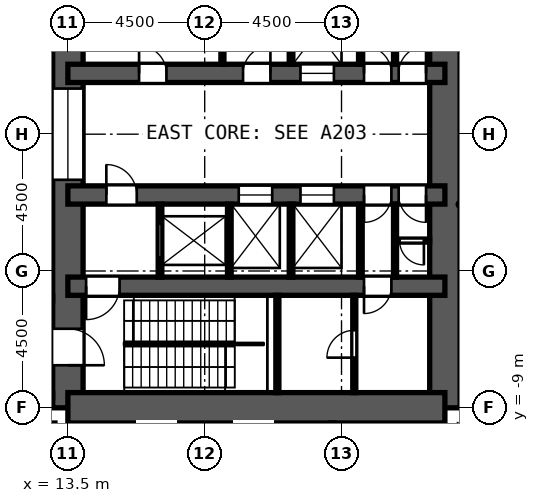
"""IFC4 building model, lengths in metres.
Left out: names, types, materials, properties, quantities, classifications, styles, units other than length and angle.
Written with IfcOpenShell. Run it as: python <this file> out.ifc"""

import sys

from ifc_helpers import new_model, si_unit, direction, frame, frame_2d, origin, place, context, subcontext, project, spatial, rectangle, extrude, element, fill, save


model = new_model("IFC4")
c1 = context("Model", 3, precision=1e-05, world=origin(), true_north=direction((0.0, 1.0)))
c2 = subcontext(c1, "Body", "Model", "MODEL_VIEW")
j1 = project(units=[si_unit("LENGTHUNIT", "METRE"), si_unit("PLANEANGLEUNIT", "RADIAN")], contexts=[c1])
p1 = place(None, origin())
s1 = spatial("IfcSite", under=j1, at=p1, CompositionType="ELEMENT")
p2 = place(p1, origin())
s2 = spatial("IfcBuilding", under=s1, at=p2, CompositionType="ELEMENT")
p3 = place(p2, origin())
s3 = spatial("IfcBuildingStorey", under=s2, at=p3, CompositionType="ELEMENT", Elevation=0.0)
p4 = place(p3, frame((13.5, -9.0, 0.0), z_axis=(0.0, 0.0, 1.0), x_axis=(0.0, 1.0, 0.0)))
e1 = element("IfcWall", 1, at=p4, inside=s3, PredefinedType="SHEAR", context=c2, shape_type="SweptSolid", body=[
    extrude(rectangle(XDim=18.0, YDim=1.0, at=frame_2d((9.0, 0.0))), origin(), (0.0, 0.0, 1.0), 5.0),
])
p5 = place(p4, frame((15.4, 0.0, 0.0)))
e2 = element("IfcOpeningElement", 2, at=p5, cuts=e1, PredefinedType="OPENING", context=c2, shape_type="SweptSolid", body=[
    extrude(rectangle(XDim=1.2, YDim=2.1, at=frame_2d((0.6, 1.05))), frame((0.0, 0.512, 0.0), z_axis=(0.0, -1.0, 0.0), x_axis=(1.0, 0.0, 0.0)), (0.0, 0.0, 1.0), 1.024),
])
p6 = place(p4, frame((1.4, 0.0, 0.0)))
e3 = element("IfcOpeningElement", 3, at=p6, cuts=e1, PredefinedType="OPENING", context=c2, shape_type="SweptSolid", body=[
    extrude(rectangle(XDim=1.2, YDim=2.1, at=frame_2d((0.6, 1.05))), frame((0.0, 0.512, 0.0), z_axis=(0.0, -1.0, 0.0), x_axis=(1.0, 0.0, 0.0)), (0.0, 0.0, 1.0), 1.024),
])
p7 = place(p4, frame((7.5, 0.0, 0.0)))
e4 = element("IfcOpeningElement", 4, at=p7, cuts=e1, PredefinedType="OPENING", context=c2, shape_type="SweptSolid", body=[
    extrude(rectangle(XDim=3.0, YDim=2.4, at=frame_2d((1.5, 1.2))), frame((0.0, 0.512, 0.0), z_axis=(0.0, -1.0, 0.0), x_axis=(1.0, 0.0, 0.0)), (0.0, 0.0, 1.0), 1.024),
])
p8 = place(p3, frame((25.9, -9.0, 0.0), z_axis=(0.0, 0.0, 1.0), x_axis=(0.0, 1.0, 0.0)))
e5 = element("IfcWall", 5, at=p8, inside=s3, PredefinedType="SHEAR", context=c2, shape_type="SweptSolid", body=[
    extrude(rectangle(XDim=18.0, YDim=1.0, at=frame_2d((9.0, 0.0))), origin(), (0.0, 0.0, 1.0), 5.0),
])
p9 = place(p3, frame((13.5, -9.0, 0.0), z_axis=(0.0, 0.0, 1.0), x_axis=(1.0, 0.0, 0.0)))
e6 = element("IfcWall", 6, at=p9, inside=s3, PredefinedType="SHEAR", context=c2, shape_type="SweptSolid", body=[
    extrude(rectangle(XDim=12.4, YDim=1.0, at=frame_2d((6.2, 0.0))), origin(), (0.0, 0.0, 1.0), 5.0),
])
p10 = place(p3, frame((13.5, -5.0, 0.0), z_axis=(0.0, 0.0, 1.0), x_axis=(1.0, 0.0, 0.0)))
e7 = element("IfcWall", 7, at=p10, inside=s3, PredefinedType="SHEAR", context=c2, shape_type="SweptSolid", body=[
    extrude(rectangle(XDim=12.4, YDim=0.6, at=frame_2d((6.2, 0.0))), origin(), (0.0, 0.0, 1.0), 5.0),
])
p11 = place(p10, frame((9.74, 0.0, 0.0)))
e8 = element("IfcOpeningElement", 8, at=p11, cuts=e7, PredefinedType="OPENING", context=c2, shape_type="SweptSolid", body=[
    extrude(rectangle(XDim=0.9, YDim=2.1, at=frame_2d((0.45, 1.05))), frame((0.0, 0.312, 0.0), z_axis=(0.0, -1.0, 0.0), x_axis=(1.0, 0.0, 0.0)), (0.0, 0.0, 1.0), 0.624),
])
p12 = place(p10, frame((0.6, 0.0, 0.0)))
e9 = element("IfcOpeningElement", 9, at=p12, cuts=e7, PredefinedType="OPENING", context=c2, shape_type="SweptSolid", body=[
    extrude(rectangle(XDim=1.1, YDim=2.1, at=frame_2d((0.55, 1.05))), frame((0.0, 0.312, 0.0), z_axis=(0.0, -1.0, 0.0), x_axis=(1.0, 0.0, 0.0)), (0.0, 0.0, 1.0), 0.624),
])
p13 = place(p3, frame((13.5, 2.0, 0.0), z_axis=(0.0, 0.0, 1.0), x_axis=(1.0, 0.0, 0.0)))
e10 = element("IfcWall", 10, at=p13, inside=s3, PredefinedType="SHEAR", context=c2, shape_type="SweptSolid", body=[
    extrude(rectangle(XDim=12.4, YDim=0.6, at=frame_2d((6.2, 0.0))), origin(), (0.0, 0.0, 1.0), 5.0),
])
p14 = place(p13, frame((7.65, 0.0, 0.0)))
e11 = element("IfcOpeningElement", 11, at=p14, cuts=e10, PredefinedType="OPENING", context=c2, shape_type="SweptSolid", body=[
    extrude(rectangle(XDim=1.1, YDim=2.1, at=frame_2d((0.55, 1.05))), frame((0.0, 0.312, 0.0), z_axis=(0.0, -1.0, 0.0), x_axis=(1.0, 0.0, 0.0)), (0.0, 0.0, 1.0), 0.624),
])
p15 = place(p13, frame((2.341, 0.0, 0.0)))
e12 = element("IfcOpeningElement", 12, at=p15, cuts=e10, PredefinedType="OPENING", context=c2, shape_type="SweptSolid", body=[
    extrude(rectangle(XDim=0.9, YDim=2.1, at=frame_2d((0.45, 1.05))), frame((0.0, 0.312, 0.0), z_axis=(0.0, -1.0, 0.0), x_axis=(1.0, 0.0, 0.0)), (0.0, 0.0, 1.0), 0.624),
])
p16 = place(p13, frame((5.761, 0.0, 0.0)))
e13 = element("IfcOpeningElement", 13, at=p16, cuts=e10, PredefinedType="OPENING", context=c2, shape_type="SweptSolid", body=[
    extrude(rectangle(XDim=0.9, YDim=2.1, at=frame_2d((0.45, 1.05))), frame((0.0, 0.312, 0.0), z_axis=(0.0, -1.0, 0.0), x_axis=(1.0, 0.0, 0.0)), (0.0, 0.0, 1.0), 0.624),
])
p17 = place(p13, frame((9.74, 0.0, 0.0)))
e14 = element("IfcOpeningElement", 14, at=p17, cuts=e10, PredefinedType="OPENING", context=c2, shape_type="SweptSolid", body=[
    extrude(rectangle(XDim=0.9, YDim=2.1, at=frame_2d((0.45, 1.05))), frame((0.0, 0.312, 0.0), z_axis=(0.0, -1.0, 0.0), x_axis=(1.0, 0.0, 0.0)), (0.0, 0.0, 1.0), 0.624),
])
p18 = place(p13, frame((10.88, 0.0, 0.0)))
e15 = element("IfcOpeningElement", 15, at=p18, cuts=e10, PredefinedType="OPENING", context=c2, shape_type="SweptSolid", body=[
    extrude(rectangle(XDim=0.9, YDim=2.1, at=frame_2d((0.45, 1.05))), frame((0.0, 0.312, 0.0), z_axis=(0.0, -1.0, 0.0), x_axis=(1.0, 0.0, 0.0)), (0.0, 0.0, 1.0), 0.624),
])
p19 = place(p3, frame((13.5, -2.0, 0.0), z_axis=(0.0, 0.0, 1.0), x_axis=(1.0, 0.0, 0.0)))
e16 = element("IfcWall", 16, at=p19, inside=s3, PredefinedType="SHEAR", context=c2, shape_type="SweptSolid", body=[
    extrude(rectangle(XDim=12.4, YDim=0.6, at=frame_2d((6.2, 0.0))), origin(), (0.0, 0.0, 1.0), 5.0),
])
p20 = place(p19, frame((5.62, 0.0, 0.0)))
e17 = element("IfcOpeningElement", 17, at=p20, cuts=e16, PredefinedType="OPENING", context=c2, shape_type="SweptSolid", body=[
    extrude(rectangle(XDim=1.1, YDim=2.1, at=frame_2d((0.55, 1.05))), frame((0.0, 0.312, 0.0), z_axis=(0.0, -1.0, 0.0), x_axis=(1.0, 0.0, 0.0)), (0.0, 0.0, 1.0), 0.624),
])
p21 = place(p19, frame((7.65, 0.0, 0.0)))
e18 = element("IfcOpeningElement", 18, at=p21, cuts=e16, PredefinedType="OPENING", context=c2, shape_type="SweptSolid", body=[
    extrude(rectangle(XDim=1.1, YDim=2.1, at=frame_2d((0.55, 1.05))), frame((0.0, 0.312, 0.0), z_axis=(0.0, -1.0, 0.0), x_axis=(1.0, 0.0, 0.0)), (0.0, 0.0, 1.0), 0.624),
])
p22 = place(p19, frame((1.265, 0.0, 0.0)))
e19 = element("IfcOpeningElement", 19, at=p22, cuts=e16, PredefinedType="OPENING", context=c2, shape_type="SweptSolid", body=[
    extrude(rectangle(XDim=1.0, YDim=2.1, at=frame_2d((0.5, 1.05))), frame((0.0, 0.312, 0.0), z_axis=(0.0, -1.0, 0.0), x_axis=(1.0, 0.0, 0.0)), (0.0, 0.0, 1.0), 0.624),
])
p23 = place(p19, frame((9.74, 0.0, 0.0)))
e20 = element("IfcOpeningElement", 20, at=p23, cuts=e16, PredefinedType="OPENING", context=c2, shape_type="SweptSolid", body=[
    extrude(rectangle(XDim=0.9, YDim=2.1, at=frame_2d((0.45, 1.05))), frame((0.0, 0.312, 0.0), z_axis=(0.0, -1.0, 0.0), x_axis=(1.0, 0.0, 0.0)), (0.0, 0.0, 1.0), 0.624),
])
p24 = place(p19, frame((10.88, 0.0, 0.0)))
e21 = element("IfcOpeningElement", 21, at=p24, cuts=e16, PredefinedType="OPENING", context=c2, shape_type="SweptSolid", body=[
    extrude(rectangle(XDim=0.9, YDim=2.1, at=frame_2d((0.45, 1.05))), frame((0.0, 0.312, 0.0), z_axis=(0.0, -1.0, 0.0), x_axis=(1.0, 0.0, 0.0)), (0.0, 0.0, 1.0), 0.624),
])
p25 = place(p3, frame((26.328, -11.255, 0.0), z_axis=(0.0, 0.0, 1.0), x_axis=(0.342034744565, 0.939687306241, 0.0)))
e22 = element("IfcWall", 22, at=p25, inside=s3, PredefinedType="SOLIDWALL", context=c2, shape_type="SweptSolid", body=[
    extrude(rectangle(XDim=4.099, YDim=0.6, at=frame_2d((2.05, 0.0))), origin(), (0.0, 0.0, 1.0), 4.45),
])
p26 = place(p25, frame((0.372, 0.0, 0.3)))
e23 = element("IfcOpeningElement", 23, at=p26, cuts=e22, PredefinedType="OPENING", context=c2, shape_type="SweptSolid", body=[
    extrude(rectangle(XDim=2.4, YDim=2.1, at=frame_2d((1.2, 1.05))), frame((0.0, 0.312, 0.0), z_axis=(0.0, -1.0, 0.0), x_axis=(1.0, 0.0, 0.0)), (0.0, 0.0, 1.0), 0.624),
])
p27 = place(p3, frame((9.8, -8.6, 0.0), z_axis=(0.0, 0.0, 1.0), x_axis=(1.0, 0.0, 0.0)))
e24 = element("IfcWall", 24, at=p27, inside=s3, PredefinedType="PARTITIONING", context=c2, shape_type="SweptSolid", body=[
    extrude(rectangle(XDim=3.2, YDim=0.15, at=frame_2d((1.6, 0.0))), origin(), (0.0, 0.0, 1.0), 4.45),
])
p28 = place(p27, frame((1.0, 0.0, 0.0)))
e25 = element("IfcOpeningElement", 25, at=p28, cuts=e24, PredefinedType="OPENING", context=c2, shape_type="SweptSolid", body=[
    extrude(rectangle(XDim=1.2, YDim=2.1, at=frame_2d((0.6, 1.05))), frame((0.0, 0.087, 0.0), z_axis=(0.0, -1.0, 0.0), x_axis=(1.0, 0.0, 0.0)), (0.0, 0.0, 1.0), 0.174),
])
p29 = place(p3, frame((9.8, -5.4, 0.0), z_axis=(0.0, 0.0, 1.0), x_axis=(1.0, 0.0, 0.0)))
e26 = element("IfcWall", 26, at=p29, inside=s3, PredefinedType="PARTITIONING", context=c2, shape_type="SweptSolid", body=[
    extrude(rectangle(XDim=3.2, YDim=0.15, at=frame_2d((1.6, 0.0))), origin(), (0.0, 0.0, 1.0), 4.45),
])
p30 = place(p29, frame((1.0, 0.0, 0.0)))
e27 = element("IfcOpeningElement", 27, at=p30, cuts=e26, PredefinedType="OPENING", context=c2, shape_type="SweptSolid", body=[
    extrude(rectangle(XDim=1.2, YDim=2.1, at=frame_2d((0.6, 1.05))), frame((0.0, 0.087, 0.0), z_axis=(0.0, -1.0, 0.0), x_axis=(1.0, 0.0, 0.0)), (0.0, 0.0, 1.0), 0.174),
])
p31 = place(p3, frame((13.0, -15.325, 0.0), z_axis=(0.0, 0.0, 1.0), x_axis=(0.0, 1.0, 0.0)))
e28 = element("IfcWall", 28, at=p31, inside=s3, PredefinedType="PARTITIONING", context=c2, shape_type="SweptSolid", body=[
    extrude(rectangle(XDim=5.825, YDim=0.15, at=frame_2d((2.913, 0.0))), origin(), (0.0, 0.0, 1.0), 4.45),
])
p32 = place(p3, frame((18.583, 2.3, 0.0), z_axis=(0.0, 0.0, 1.0), x_axis=(0.0, 1.0, 0.0)))
e29 = element("IfcWall", 29, at=p32, inside=s3, PredefinedType="PARTITIONING", context=c2, shape_type="SweptSolid", body=[
    extrude(rectangle(XDim=2.4, YDim=0.1, at=frame_2d((1.2, 0.0))), origin(), (0.0, 0.0, 1.0), 4.45),
])
for number, where, z_axis, x_axis in (
    (30, (20.84, 2.3, 0.0), (0.0, 0.0, 1.0), (0.0, 1.0, 0.0)),
    (31, (23.12, 2.3, 0.0), (0.0, 0.0, 1.0), (0.0, 1.0, 0.0)),
):
    element("IfcWall", number, at=place(p3, frame(where, z_axis=z_axis, x_axis=x_axis)), inside=s3, PredefinedType="PARTITIONING", context=c2, shape_type="SweptSolid", body=[
        extrude(rectangle(XDim=2.4, YDim=0.12, at=frame_2d((1.2, 0.0))), origin(), (0.0, 0.0, 1.0), 4.45),
    ])
p33 = place(p3, frame((24.26, 2.3, 0.0), z_axis=(0.0, 0.0, 1.0), x_axis=(0.0, 1.0, 0.0)))
e32 = element("IfcWall", 32, at=p33, inside=s3, PredefinedType="PARTITIONING", context=c2, shape_type="SweptSolid", body=[
    extrude(rectangle(XDim=2.4, YDim=0.1, at=frame_2d((1.2, 0.0))), origin(), (0.0, 0.0, 1.0), 4.45),
])
p34 = place(p3, frame((16.53, -4.7, 0.0), z_axis=(0.0, 0.0, 1.0), x_axis=(0.0, 1.0, 0.0)))
e33 = element("IfcWall", 33, at=p34, inside=s3, PredefinedType="PARTITIONING", context=c2, shape_type="SweptSolid", body=[
    extrude(rectangle(XDim=2.4, YDim=0.12, at=frame_2d((1.2, 0.0))), origin(), (0.0, 0.0, 1.0), 4.45),
])
p35 = place(p34, frame((0.65, 0.0, 0.0)))
e34 = element("IfcOpeningElement", 34, at=p35, cuts=e33, PredefinedType="OPENING", context=c2, shape_type="SweptSolid", body=[
    extrude(rectangle(XDim=1.1, YDim=2.1, at=frame_2d((0.55, 1.05))), frame((0.0, 0.072, 0.0), z_axis=(0.0, -1.0, 0.0), x_axis=(1.0, 0.0, 0.0)), (0.0, 0.0, 1.0), 0.144),
])
for number, where, z_axis, x_axis in (
    (35, (18.81, -4.7, 0.0), (0.0, 0.0, 1.0), (0.0, 1.0, 0.0)),
    (36, (20.84, -4.7, 0.0), (0.0, 0.0, 1.0), (0.0, 1.0, 0.0)),
    (37, (23.12, -4.7, 0.0), (0.0, 0.0, 1.0), (0.0, 1.0, 0.0)),
):
    element("IfcWall", number, at=place(p3, frame(where, z_axis=z_axis, x_axis=x_axis)), inside=s3, PredefinedType="PARTITIONING", context=c2, shape_type="SweptSolid", body=[
        extrude(rectangle(XDim=2.4, YDim=0.12, at=frame_2d((1.2, 0.0))), origin(), (0.0, 0.0, 1.0), 4.45),
    ])
p36 = place(p3, frame((24.26, -4.7, 0.0), z_axis=(0.0, 0.0, 1.0), x_axis=(0.0, 1.0, 0.0)))
e38 = element("IfcWall", 38, at=p36, inside=s3, PredefinedType="PARTITIONING", context=c2, shape_type="SweptSolid", body=[
    extrude(rectangle(XDim=2.4, YDim=0.1, at=frame_2d((1.2, 0.0))), origin(), (0.0, 0.0, 1.0), 4.45),
])
p37 = place(p3, frame((24.26, -3.5, 0.0), z_axis=(0.0, 0.0, 1.0), x_axis=(1.0, 0.0, 0.0)))
e39 = element("IfcWall", 39, at=p37, inside=s3, PredefinedType="PARTITIONING", context=c2, shape_type="SweptSolid", body=[
    extrude(rectangle(XDim=1.14, YDim=0.1, at=frame_2d((0.57, 0.0))), origin(), (0.0, 0.0, 1.0), 4.45),
])
p38 = place(p37, frame((0.15, 0.0, 0.0)))
e40 = element("IfcOpeningElement", 40, at=p38, cuts=e39, PredefinedType="OPENING", context=c2, shape_type="SweptSolid", body=[
    extrude(rectangle(XDim=0.8, YDim=2.1, at=frame_2d((0.4, 1.05))), frame((0.0, 0.062, 0.0), z_axis=(0.0, -1.0, 0.0), x_axis=(1.0, 0.0, 0.0)), (0.0, 0.0, 1.0), 0.124),
])
p39 = place(p3, frame((20.39, -8.5, 0.0), z_axis=(0.0, 0.0, 1.0), x_axis=(0.0, 1.0, 0.0)))
e41 = element("IfcWall", 41, at=p39, inside=s3, PredefinedType="PARTITIONING", context=c2, shape_type="SweptSolid", body=[
    extrude(rectangle(XDim=3.2, YDim=0.1, at=frame_2d((1.6, 0.0))), origin(), (0.0, 0.0, 1.0), 4.45),
])
p40 = place(p3, frame((22.92, -8.5, 0.0), z_axis=(0.0, 0.0, 1.0), x_axis=(0.0, 1.0, 0.0)))
e42 = element("IfcWall", 42, at=p40, inside=s3, PredefinedType="PARTITIONING", context=c2, shape_type="SweptSolid", body=[
    extrude(rectangle(XDim=3.2, YDim=0.1, at=frame_2d((1.6, 0.0))), origin(), (0.0, 0.0, 1.0), 4.45),
])
p41 = place(p40, frame((1.15, 0.0, 0.0)))
e43 = element("IfcOpeningElement", 43, at=p41, cuts=e42, PredefinedType="OPENING", context=c2, shape_type="SweptSolid", body=[
    extrude(rectangle(XDim=0.9, YDim=2.1, at=frame_2d((0.45, 1.05))), frame((0.0, 0.062, 0.0), z_axis=(0.0, -1.0, 0.0), x_axis=(1.0, 0.0, 0.0)), (0.0, 0.0, 1.0), 0.124),
])
p42 = place(p14, origin())
e44 = element("IfcDoor", 44, at=p42, inside=s3, OperationType="DOUBLE_DOOR_SLIDING", PredefinedType="DOOR", context=c2, shape_type="SweptSolid", body=[
    extrude(rectangle(XDim=1.1, YDim=2.1, at=frame_2d((0.55, 1.05))), frame((0.0, 0.025, 0.0), z_axis=(0.0, -1.0, 0.0), x_axis=(1.0, 0.0, 0.0)), (0.0, 0.0, 1.0), 0.05),
])
fill(e11, e44)
p43 = place(p35, origin())
e45 = element("IfcDoor", 45, at=p43, inside=s3, OperationType="DOUBLE_DOOR_SLIDING", PredefinedType="DOOR", context=c2, shape_type="SweptSolid", body=[
    extrude(rectangle(XDim=1.1, YDim=2.1, at=frame_2d((0.55, 1.05))), frame((0.0, 0.025, 0.0), z_axis=(0.0, -1.0, 0.0), x_axis=(1.0, 0.0, 0.0)), (0.0, 0.0, 1.0), 0.05),
])
fill(e34, e45)
p44 = place(p20, origin())
e46 = element("IfcDoor", 46, at=p44, inside=s3, OperationType="DOUBLE_DOOR_SLIDING", PredefinedType="DOOR", context=c2, shape_type="SweptSolid", body=[
    extrude(rectangle(XDim=1.1, YDim=2.1, at=frame_2d((0.55, 1.05))), frame((0.0, 0.025, 0.0), z_axis=(0.0, -1.0, 0.0), x_axis=(1.0, 0.0, 0.0)), (0.0, 0.0, 1.0), 0.05),
])
fill(e17, e46)
p45 = place(p21, origin())
e47 = element("IfcDoor", 47, at=p45, inside=s3, OperationType="DOUBLE_DOOR_SLIDING", PredefinedType="DOOR", context=c2, shape_type="SweptSolid", body=[
    extrude(rectangle(XDim=1.1, YDim=2.1, at=frame_2d((0.55, 1.05))), frame((0.0, 0.025, 0.0), z_axis=(0.0, -1.0, 0.0), x_axis=(1.0, 0.0, 0.0)), (0.0, 0.0, 1.0), 0.05),
])
fill(e18, e47)
p46 = place(p15, origin())
e48 = element("IfcDoor", 48, at=p46, inside=s3, OperationType="SINGLE_SWING_LEFT", PredefinedType="DOOR", context=c2, shape_type="SweptSolid", body=[
    extrude(rectangle(XDim=0.9, YDim=2.1, at=frame_2d((0.45, 1.05))), frame((0.0, 0.025, 0.0), z_axis=(0.0, -1.0, 0.0), x_axis=(1.0, 0.0, 0.0)), (0.0, 0.0, 1.0), 0.05),
])
fill(e12, e48)
p47 = place(p16, origin())
e49 = element("IfcDoor", 49, at=p47, inside=s3, OperationType="SINGLE_SWING_RIGHT", PredefinedType="DOOR", context=c2, shape_type="SweptSolid", body=[
    extrude(rectangle(XDim=0.9, YDim=2.1, at=frame_2d((0.45, 1.05))), frame((0.0, 0.025, 0.0), z_axis=(0.0, -1.0, 0.0), x_axis=(1.0, 0.0, 0.0)), (0.0, 0.0, 1.0), 0.05),
])
fill(e13, e49)
p48 = place(p17, origin())
e50 = element("IfcDoor", 50, at=p48, inside=s3, OperationType="SINGLE_SWING_LEFT", PredefinedType="DOOR", context=c2, shape_type="SweptSolid", body=[
    extrude(rectangle(XDim=0.9, YDim=2.1, at=frame_2d((0.45, 1.05))), frame((0.0, 0.025, 0.0), z_axis=(0.0, -1.0, 0.0), x_axis=(1.0, 0.0, 0.0)), (0.0, 0.0, 1.0), 0.05),
])
fill(e14, e50)
p49 = place(p18, origin())
e51 = element("IfcDoor", 51, at=p49, inside=s3, OperationType="SINGLE_SWING_RIGHT", PredefinedType="DOOR", context=c2, shape_type="SweptSolid", body=[
    extrude(rectangle(XDim=0.9, YDim=2.1, at=frame_2d((0.45, 1.05))), frame((0.0, 0.025, 0.0), z_axis=(0.0, -1.0, 0.0), x_axis=(1.0, 0.0, 0.0)), (0.0, 0.0, 1.0), 0.05),
])
fill(e15, e51)
p50 = place(p22, origin())
e52 = element("IfcDoor", 52, at=p50, inside=s3, OperationType="SINGLE_SWING_LEFT", PredefinedType="DOOR", context=c2, shape_type="SweptSolid", body=[
    extrude(rectangle(XDim=1.0, YDim=2.1, at=frame_2d((0.5, 1.05))), frame((0.0, 0.025, 0.0), z_axis=(0.0, -1.0, 0.0), x_axis=(1.0, 0.0, 0.0)), (0.0, 0.0, 1.0), 0.05),
])
fill(e19, e52)
p51 = place(p23, frame((0.9, 0.0, 0.0), z_axis=(0.0, 0.0, 1.0), x_axis=(-1.0, 0.0, 0.0)))
e53 = element("IfcDoor", 53, at=p51, inside=s3, OperationType="SINGLE_SWING_RIGHT", PredefinedType="DOOR", context=c2, shape_type="SweptSolid", body=[
    extrude(rectangle(XDim=0.9, YDim=2.1, at=frame_2d((0.45, 1.05))), frame((0.0, 0.025, 0.0), z_axis=(0.0, -1.0, 0.0), x_axis=(1.0, 0.0, 0.0)), (0.0, 0.0, 1.0), 0.05),
])
fill(e20, e53)
p52 = place(p24, frame((0.9, 0.0, 0.0), z_axis=(0.0, 0.0, 1.0), x_axis=(-1.0, 0.0, 0.0)))
e54 = element("IfcDoor", 54, at=p52, inside=s3, OperationType="SINGLE_SWING_LEFT", PredefinedType="DOOR", context=c2, shape_type="SweptSolid", body=[
    extrude(rectangle(XDim=0.9, YDim=2.1, at=frame_2d((0.45, 1.05))), frame((0.0, 0.025, 0.0), z_axis=(0.0, -1.0, 0.0), x_axis=(1.0, 0.0, 0.0)), (0.0, 0.0, 1.0), 0.05),
])
fill(e21, e54)
p53 = place(p38, frame((0.8, 0.0, 0.0), z_axis=(0.0, 0.0, 1.0), x_axis=(-1.0, 0.0, 0.0)))
e55 = element("IfcDoor", 55, at=p53, inside=s3, OperationType="SINGLE_SWING_LEFT", PredefinedType="DOOR", context=c2, shape_type="SweptSolid", body=[
    extrude(rectangle(XDim=0.8, YDim=2.1, at=frame_2d((0.4, 1.05))), frame((0.0, 0.025, 0.0), z_axis=(0.0, -1.0, 0.0), x_axis=(1.0, 0.0, 0.0)), (0.0, 0.0, 1.0), 0.05),
])
fill(e40, e55)
p54 = place(p41, origin())
e56 = element("IfcDoor", 56, at=p54, inside=s3, OperationType="SINGLE_SWING_LEFT", PredefinedType="DOOR", context=c2, shape_type="SweptSolid", body=[
    extrude(rectangle(XDim=0.9, YDim=2.1, at=frame_2d((0.45, 1.05))), frame((0.0, 0.025, 0.0), z_axis=(0.0, -1.0, 0.0), x_axis=(1.0, 0.0, 0.0)), (0.0, 0.0, 1.0), 0.05),
])
fill(e43, e56)
p55 = place(p11, frame((0.9, 0.0, 0.0), z_axis=(0.0, 0.0, 1.0), x_axis=(-1.0, 0.0, 0.0)))
e57 = element("IfcDoor", 57, at=p55, inside=s3, OperationType="SINGLE_SWING_RIGHT", PredefinedType="DOOR", context=c2, shape_type="SweptSolid", body=[
    extrude(rectangle(XDim=0.9, YDim=2.1, at=frame_2d((0.45, 1.05))), frame((0.0, 0.025, 0.0), z_axis=(0.0, -1.0, 0.0), x_axis=(1.0, 0.0, 0.0)), (0.0, 0.0, 1.0), 0.05),
])
fill(e8, e57)
p56 = place(p12, frame((1.1, 0.0, 0.0), z_axis=(0.0, 0.0, 1.0), x_axis=(-1.0, 0.0, 0.0)))
e58 = element("IfcDoor", 58, at=p56, inside=s3, OperationType="SINGLE_SWING_RIGHT", PredefinedType="DOOR", context=c2, shape_type="SweptSolid", body=[
    extrude(rectangle(XDim=1.1, YDim=2.1, at=frame_2d((0.55, 1.05))), frame((0.0, 0.025, 0.0), z_axis=(0.0, -1.0, 0.0), x_axis=(1.0, 0.0, 0.0)), (0.0, 0.0, 1.0), 0.05),
])
fill(e9, e58)
p57 = place(p6, frame((1.2, 0.0, 0.0), z_axis=(0.0, 0.0, 1.0), x_axis=(-1.0, 0.0, 0.0)))
e59 = element("IfcDoor", 59, at=p57, inside=s3, OperationType="SINGLE_SWING_RIGHT", PredefinedType="DOOR", context=c2, shape_type="SweptSolid", body=[
    extrude(rectangle(XDim=1.2, YDim=2.1, at=frame_2d((0.6, 1.05))), frame((0.0, 0.025, 0.0), z_axis=(0.0, -1.0, 0.0), x_axis=(1.0, 0.0, 0.0)), (0.0, 0.0, 1.0), 0.05),
])
fill(e3, e59)
p58 = place(p7, origin())
e60 = element("IfcDoor", 60, at=p58, inside=s3, OperationType="DOUBLE_DOOR_SLIDING", PredefinedType="DOOR", context=c2, shape_type="SweptSolid", body=[
    extrude(rectangle(XDim=3.0, YDim=2.4, at=frame_2d((1.5, 1.2))), frame((0.0, 0.025, 0.0), z_axis=(0.0, -1.0, 0.0), x_axis=(1.0, 0.0, 0.0)), (0.0, 0.0, 1.0), 0.05),
])
fill(e4, e60)
save(model, sys.argv[1])
